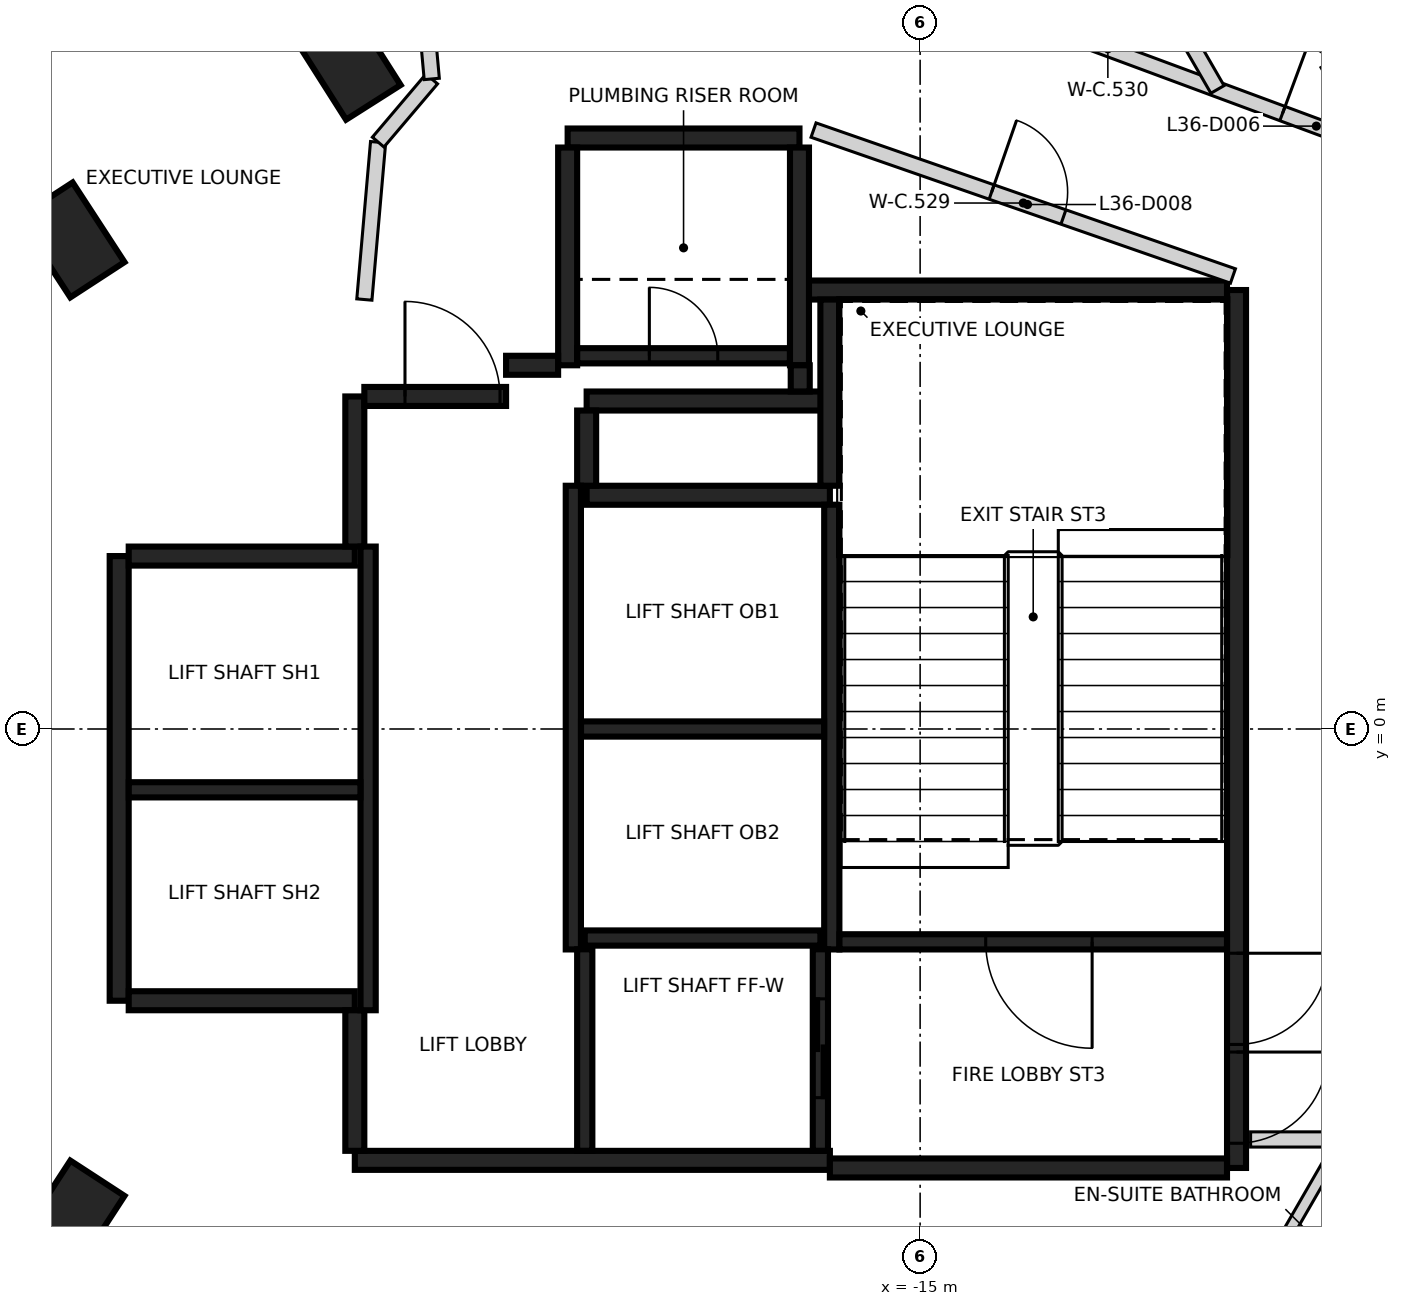
"""IFC4 building model, lengths in metres.
Left out: names, types, materials, properties, quantities, classifications, styles, units other than length and angle.
Written with IfcOpenShell. Run it as: python <this file> out.ifc"""

import sys

from ifc_helpers import new_model, si_unit, direction, frame, frame_2d, origin, origin_2d, place, context, subcontext, project, spatial, rectangle, extrude, element, fill, save


model = new_model("IFC4")
c1 = context("Model", 3, precision=1e-05, world=origin(), true_north=direction((0.0, 1.0)))
c2 = subcontext(c1, "Body", "Model", "MODEL_VIEW")
j1 = project(units=[si_unit("LENGTHUNIT", "METRE"), si_unit("PLANEANGLEUNIT", "RADIAN")], contexts=[c1])
p1 = place(None, origin())
s1 = spatial("IfcSite", under=j1, at=p1, CompositionType="ELEMENT")
p2 = place(p1, origin())
s2 = spatial("IfcBuilding", under=s1, at=p2, CompositionType="ELEMENT")
p3 = place(p2, frame((0.0, 0.0, 146.8)))
s3 = spatial("IfcBuildingStorey", under=s2, at=p3, CompositionType="ELEMENT", Elevation=146.8)
for number, where, z_axis, x_axis in (
    (1, (-22.529, 8.772, -0.4), (0.0, 0.0, 1.0), (-0.536, 0.844, 0.0)),
    (2, (-26.165, 6.434, -0.4), (0.0, 0.0, 1.0), (-0.546, 0.838, 0.0)),
    (3, (-26.165, -6.434, -0.4), (0.0, 0.0, 1.0), (0.546, 0.838, 0.0)),
):
    element("IfcColumn", number, at=place(p3, frame(where, z_axis=z_axis, x_axis=x_axis)), inside=s3, PredefinedType="COLUMN", context=c2, shape_type="SweptSolid", body=[
        extrude(rectangle(XDim=1.25, YDim=0.85, at=origin_2d()), origin(), (0.0, 0.0, 1.0), 3.6),
    ])
p4 = place(p3, frame((-10.837, 5.775, 0.0), z_axis=(0.0, 0.0, 1.0), x_axis=(0.0, -1.0, 0.0)))
e4 = element("IfcWall", 4, at=p4, inside=s3, PredefinedType="SHEAR", context=c2, shape_type="SweptSolid", body=[
    extrude(rectangle(XDim=11.55, YDim=0.25, at=frame_2d((5.775, 0.0))), origin(), (0.0, 0.0, 1.0), 3.2),
])
p5 = place(p4, frame((10.025, 0.0, 0.0)))
e5 = element("IfcOpeningElement", 5, at=p5, cuts=e4, PredefinedType="OPENING", context=c2, shape_type="SweptSolid", body=[
    extrude(rectangle(XDim=1.2, YDim=2.1, at=frame_2d((0.6, 1.05))), frame((0.0, 0.135, 0.0), z_axis=(0.0, -1.0, 0.0), x_axis=(1.0, 0.0, 0.0)), (0.0, 0.0, 1.0), 0.27),
])
p6 = place(p4, frame((8.725, 0.0, 0.0)))
e6 = element("IfcOpeningElement", 6, at=p6, cuts=e4, PredefinedType="OPENING", context=c2, shape_type="SweptSolid", body=[
    extrude(rectangle(XDim=1.2, YDim=2.1, at=frame_2d((0.6, 1.05))), frame((0.0, 0.135, 0.0), z_axis=(0.0, -1.0, 0.0), x_axis=(1.0, 0.0, 0.0)), (0.0, 0.0, 1.0), 0.27),
])
p7 = place(p3, frame((-16.187, -5.675, 0.0), z_axis=(0.0, 0.0, 1.0), x_axis=(-1.0, 0.0, 0.0)))
e7 = element("IfcWall", 7, at=p7, inside=s3, PredefinedType="SHEAR", context=c2, shape_type="SweptSolid", body=[
    extrude(rectangle(XDim=6.25, YDim=0.25, at=frame_2d((3.125, 0.0))), origin(), (0.0, 0.0, 1.0), 3.2),
])
p8 = place(p3, frame((-25.537, -3.575, 0.0), z_axis=(0.0, 0.0, 1.0), x_axis=(0.0, 1.0, 0.0)))
e8 = element("IfcWall", 8, at=p8, inside=s3, PredefinedType="SHEAR", context=c2, shape_type="SweptSolid", body=[
    extrude(rectangle(XDim=5.85, YDim=0.25, at=frame_2d((2.925, 0.0))), origin(), (0.0, 0.0, 1.0), 3.2),
])
p9 = place(p3, frame((-10.963, -5.775, 0.0), z_axis=(0.0, 0.0, 1.0), x_axis=(-1.0, 0.0, 0.0)))
e9 = element("IfcWall", 9, at=p9, inside=s3, PredefinedType="SHEAR", context=c2, shape_type="SweptSolid", body=[
    extrude(rectangle(XDim=5.225, YDim=0.25, at=frame_2d((2.612, 0.0))), origin(), (0.0, 0.0, 1.0), 3.2),
])
p10 = place(p3, frame((-16.472, 5.775, 0.0), z_axis=(0.0, 0.0, 1.0), x_axis=(1.0, 0.0, 0.0)))
e10 = element("IfcWall", 10, at=p10, inside=s3, PredefinedType="SHEAR", context=c2, shape_type="SweptSolid", body=[
    extrude(rectangle(XDim=5.51, YDim=0.25, at=frame_2d((2.755, 0.0))), origin(), (0.0, 0.0, 1.0), 3.2),
])
p11 = place(p3, frame((-19.387, 3.075, 0.0), z_axis=(0.0, 0.0, 1.0), x_axis=(1.0, 0.0, 0.0)))
e11 = element("IfcWall", 11, at=p11, inside=s3, PredefinedType="SHEAR", context=c2, shape_type="SweptSolid", body=[
    extrude(rectangle(XDim=3.2, YDim=0.25, at=frame_2d((1.6, 0.0))), origin(), (0.0, 0.0, 1.0), 3.2),
])
for number, where, z_axis, x_axis in (
    (12, (-22.437, -3.575, 0.0), (0.0, 0.0, 1.0), (-1.0, 0.0, 0.0)),
    (13, (-25.412, 2.275, 0.0), (0.0, 0.0, 1.0), (1.0, 0.0, 0.0)),
):
    element("IfcWall", number, at=place(p3, frame(where, z_axis=z_axis, x_axis=x_axis)), inside=s3, PredefinedType="SHEAR", context=c2, shape_type="SweptSolid", body=[
        extrude(rectangle(XDim=2.975, YDim=0.25, at=frame_2d((1.487, 0.0))), origin(), (0.0, 0.0, 1.0), 3.2),
    ])
p12 = place(p3, frame((-19.637, 7.775, 0.0), z_axis=(0.0, 0.0, 1.0), x_axis=(1.0, 0.0, 0.0)))
e14 = element("IfcWall", 14, at=p12, inside=s3, PredefinedType="SHEAR", context=c2, shape_type="SweptSolid", body=[
    extrude(rectangle(XDim=3.05, YDim=0.25, at=frame_2d((1.525, 0.0))), origin(), (0.0, 0.0, 1.0), 3.2),
])
for number, where, z_axis, x_axis in (
    (15, (-16.587, 7.65, 0.0), (0.0, 0.0, 1.0), (0.0, -1.0, 0.0)),
    (16, (-19.637, 4.785, 0.0), (0.0, 0.0, 1.0), (0.0, 1.0, 0.0)),
):
    element("IfcWall", number, at=place(p3, frame(where, z_axis=z_axis, x_axis=x_axis)), inside=s3, PredefinedType="SHEAR", context=c2, shape_type="SweptSolid", body=[
        extrude(rectangle(XDim=2.865, YDim=0.25, at=frame_2d((1.432, 0.0))), origin(), (0.0, 0.0, 1.0), 3.2),
    ])
p13 = place(p3, frame((-16.302, 4.315, 0.0), z_axis=(0.0, 0.0, 1.0), x_axis=(-1.0, 0.0, 0.0)))
e17 = element("IfcWall", 17, at=p13, inside=s3, PredefinedType="SHEAR", context=c2, shape_type="SweptSolid", body=[
    extrude(rectangle(XDim=3.085, YDim=0.25, at=frame_2d((1.542, 0.0))), origin(), (0.0, 0.0, 1.0), 3.2),
])
p14 = place(p3, frame((-16.187, 3.2, 0.0), z_axis=(0.0, 0.0, 1.0), x_axis=(0.0, 1.0, 0.0)))
e18 = element("IfcWall", 18, at=p14, inside=s3, PredefinedType="SHEAR", context=c2, shape_type="SweptSolid", body=[
    extrude(rectangle(XDim=2.449, YDim=0.25, at=frame_2d((1.225, 0.0))), origin(), (0.0, 0.0, 1.0), 3.2),
])
p15 = place(p3, frame((-22.437, 2.4, 0.0), z_axis=(0.0, 0.0, 1.0), x_axis=(0.0, 1.0, 0.0)))
e19 = element("IfcWall", 19, at=p15, inside=s3, PredefinedType="SHEAR", context=c2, shape_type="SweptSolid", body=[
    extrude(rectangle(XDim=1.975, YDim=0.25, at=frame_2d((0.987, 0.0))), origin(), (0.0, 0.0, 1.0), 3.2),
])
p16 = place(p3, frame((-22.437, -5.55, 0.0), z_axis=(0.0, 0.0, 1.0), x_axis=(0.0, 1.0, 0.0)))
e20 = element("IfcWall", 20, at=p16, inside=s3, PredefinedType="SHEAR", context=c2, shape_type="SweptSolid", body=[
    extrude(rectangle(XDim=1.849, YDim=0.25, at=frame_2d((0.925, 0.0))), origin(), (0.0, 0.0, 1.0), 3.2),
])
p17 = place(p3, frame((-22.312, 4.375, 0.0), z_axis=(0.0, 0.0, 1.0), x_axis=(1.0, 0.0, 0.0)))
e21 = element("IfcWall", 21, at=p17, inside=s3, PredefinedType="SHEAR", context=c2, shape_type="SweptSolid", body=[
    extrude(rectangle(XDim=1.865, YDim=0.25, at=frame_2d((0.932, 0.0))), origin(), (0.0, 0.0, 1.0), 3.2),
])
p18 = place(p17, frame((0.535, 0.0, 0.0)))
e22 = element("IfcOpeningElement", 22, at=p18, cuts=e21, PredefinedType="OPENING", context=c2, shape_type="SweptSolid", body=[
    extrude(rectangle(XDim=1.25, YDim=2.1, at=frame_2d((0.625, 1.05))), frame((0.0, 0.135, 0.0), z_axis=(0.0, -1.0, 0.0), x_axis=(1.0, 0.0, 0.0)), (0.0, 0.0, 1.0), 0.27),
])
p19 = place(p3, frame((-19.387, 4.19, 0.0), z_axis=(0.0, 0.0, 1.0), x_axis=(0.0, -1.0, 0.0)))
e23 = element("IfcWall", 23, at=p19, inside=s3, PredefinedType="SHEAR", context=c2, shape_type="SweptSolid", body=[
    extrude(rectangle(XDim=0.989, YDim=0.25, at=frame_2d((0.495, 0.0))), origin(), (0.0, 0.0, 1.0), 3.2),
])
p20 = place(p3, frame((-20.447, 4.785, 0.0), z_axis=(0.0, 0.0, 1.0), x_axis=(1.0, 0.0, 0.0)))
e24 = element("IfcWall", 24, at=p20, inside=s3, PredefinedType="SHEAR", context=c2, shape_type="SweptSolid", body=[
    extrude(rectangle(XDim=0.685, YDim=0.25, at=frame_2d((0.342, 0.0))), origin(), (0.0, 0.0, 1.0), 3.2),
])
p21 = place(p3, frame((-16.577, 4.785, 0.0), z_axis=(0.0, 0.0, 1.0), x_axis=(0.0, -1.0, 0.0)))
e25 = element("IfcWall", 25, at=p21, inside=s3, PredefinedType="SHEAR", context=c2, shape_type="SweptSolid", body=[
    extrude(rectangle(XDim=0.344, YDim=0.25, at=frame_2d((0.172, 0.0))), origin(), (0.0, 0.0, 1.0), 3.2),
])
p22 = place(p3, frame((-16.162, 2.951, 0.0), z_axis=(0.0, 0.0, 1.0), x_axis=(0.0, -1.0, 0.0)))
e26 = element("IfcWall", 26, at=p22, inside=s3, PredefinedType="SHEAR", context=c2, shape_type="SweptSolid", body=[
    extrude(rectangle(XDim=5.851, YDim=0.2, at=frame_2d((2.925, 0.0))), origin(), (0.0, 0.0, 1.0), 3.2),
])
for number, where, z_axis, x_axis in (
    (27, (-19.562, -2.9, 0.0), (0.0, 0.0, 1.0), (0.0, 1.0, 0.0)),
    (28, (-22.262, 2.4, 0.0), (0.0, 0.0, 1.0), (0.0, -1.0, 0.0)),
):
    element("IfcWall", number, at=place(p3, frame(where, z_axis=z_axis, x_axis=x_axis)), inside=s3, PredefinedType="SHEAR", context=c2, shape_type="SweptSolid", body=[
        extrude(rectangle(XDim=6.1, YDim=0.2, at=frame_2d((3.05, 0.0))), origin(), (0.0, 0.0, 1.0), 3.2),
    ])
p23 = place(p3, frame((-10.963, -2.8, 0.0), z_axis=(0.0, 0.0, 1.0), x_axis=(-1.0, 0.0, 0.0)))
e29 = element("IfcWall", 29, at=p23, inside=s3, PredefinedType="SHEAR", context=c2, shape_type="SweptSolid", body=[
    extrude(rectangle(XDim=5.098, YDim=0.2, at=frame_2d((2.549, 0.0))), origin(), (0.0, 0.0, 1.0), 3.2),
])
p24 = place(p23, frame((1.774, 0.0, 0.0)))
e30 = element("IfcOpeningElement", 30, at=p24, cuts=e29, PredefinedType="OPENING", context=c2, shape_type="SweptSolid", body=[
    extrude(rectangle(XDim=1.4, YDim=2.1, at=frame_2d((0.7, 1.05))), frame((0.0, 0.11, 0.0), z_axis=(0.0, -1.0, 0.0), x_axis=(1.0, 0.0, 0.0)), (0.0, 0.0, 1.0), 0.22),
])
p25 = place(p3, frame((-16.263, 0.0, 0.0), z_axis=(0.0, 0.0, 1.0), x_axis=(-1.0, 0.0, 0.0)))
e31 = element("IfcWall", 31, at=p25, inside=s3, PredefinedType="SHEAR", context=c2, shape_type="SweptSolid", body=[
    extrude(rectangle(XDim=3.198, YDim=0.2, at=frame_2d((1.599, 0.0))), origin(), (0.0, 0.0, 1.0), 3.2),
])
p26 = place(p3, frame((-22.363, -0.8, 0.0), z_axis=(0.0, 0.0, 1.0), x_axis=(-1.0, 0.0, 0.0)))
e32 = element("IfcWall", 32, at=p26, inside=s3, PredefinedType="SHEAR", context=c2, shape_type="SweptSolid", body=[
    extrude(rectangle(XDim=3.048, YDim=0.2, at=frame_2d((1.524, 0.0))), origin(), (0.0, 0.0, 1.0), 3.2),
])
p27 = place(p3, frame((-19.511, 4.91, 0.0), z_axis=(0.0, 0.0, 1.0), x_axis=(1.0, 0.0, 0.0)))
e33 = element("IfcWall", 33, at=p27, inside=s3, PredefinedType="SHEAR", context=c2, shape_type="SweptSolid", body=[
    extrude(rectangle(XDim=2.798, YDim=0.2, at=frame_2d((1.399, 0.0))), origin(), (0.0, 0.0, 1.0), 3.2),
])
p28 = place(p27, frame((0.949, 0.0, 0.0)))
e34 = element("IfcOpeningElement", 34, at=p28, cuts=e33, PredefinedType="OPENING", context=c2, shape_type="SweptSolid", body=[
    extrude(rectangle(XDim=0.9, YDim=2.1, at=frame_2d((0.45, 1.05))), frame((0.0, 0.11, 0.0), z_axis=(0.0, -1.0, 0.0), x_axis=(1.0, 0.0, 0.0)), (0.0, 0.0, 1.0), 0.22),
])
p29 = place(p3, frame((-19.412, -2.75, 0.0), z_axis=(0.0, 0.0, 1.0), x_axis=(1.0, 0.0, 0.0)))
e35 = element("IfcWall", 35, at=p29, inside=s3, PredefinedType="SHEAR", context=c2, shape_type="SweptSolid", body=[
    extrude(rectangle(XDim=3.1, YDim=0.2, at=frame_2d((1.55, 0.0))), origin(), (0.0, 0.0, 1.0), 3.2),
])
p30 = place(p3, frame((-16.312, -2.898, 0.0), z_axis=(0.0, 0.0, 1.0), x_axis=(0.0, -1.0, 0.0)))
e36 = element("IfcWall", 36, at=p30, inside=s3, PredefinedType="SHEAR", context=c2, shape_type="SweptSolid", body=[
    extrude(rectangle(XDim=2.651, YDim=0.2, at=frame_2d((1.325, 0.0))), origin(), (0.0, 0.0, 1.0), 3.2),
])
p31 = place(p30, frame((0.652, 0.0, 0.0)))
e37 = element("IfcOpeningElement", 37, at=p31, cuts=e36, PredefinedType="OPENING", context=c2, shape_type="SweptSolid", body=[
    extrude(rectangle(XDim=1.3, YDim=2.1, at=frame_2d((0.65, 1.05))), frame((0.0, 0.11, 0.0), z_axis=(0.0, -1.0, 0.0), x_axis=(1.0, 0.0, 0.0)), (0.0, 0.0, 1.0), 0.22),
])
p32 = place(p3, frame((-19.412, -5.549, 0.0), z_axis=(0.0, 0.0, 1.0), x_axis=(0.0, 1.0, 0.0)))
e38 = element("IfcWall", 38, at=p32, inside=s3, PredefinedType="SHEAR", context=c2, shape_type="SweptSolid", body=[
    extrude(rectangle(XDim=2.651, YDim=0.2, at=frame_2d((1.325, 0.0))), origin(), (0.0, 0.0, 1.0), 3.2),
])
p33 = place(p3, frame((-22.131, 7.72, 0.0), z_axis=(0.0, 0.0, 1.0), x_axis=(-0.086827346826, -0.996223374471, 0.0)))
e39 = element("IfcWall", 39, at=p33, inside=s3, PredefinedType="PARTITIONING", context=c2, shape_type="SweptSolid", body=[
    extrude(rectangle(XDim=2.078, YDim=0.2, at=frame_2d((1.039, 0.0))), origin(), (0.0, 0.0, 1.0), 3.2),
])
p34 = place(p3, frame((-22.13, 7.721, 0.0), z_axis=(0.0, 0.0, 1.0), x_axis=(0.646815590698, 0.762646439466, 0.0)))
e40 = element("IfcWall", 40, at=p34, inside=s3, PredefinedType="PARTITIONING", context=c2, shape_type="SweptSolid", body=[
    extrude(rectangle(XDim=1.09, YDim=0.2, at=frame_2d((0.545, 0.0))), origin(), (0.0, 0.0, 1.0), 3.2),
])
p35 = place(p3, frame((-21.521, 9.614, 0.0), z_axis=(0.0, 0.0, 1.0), x_axis=(0.089978363699, -0.995943720331, 0.0)))
e41 = element("IfcWall", 41, at=p35, inside=s3, PredefinedType="PARTITIONING", context=c2, shape_type="SweptSolid", body=[
    extrude(rectangle(XDim=1.066, YDim=0.2, at=frame_2d((0.533, 0.0))), origin(), (0.0, 0.0, 1.0), 2.3),
])
p36 = place(p3, frame((-16.402, 7.879, 0.0), z_axis=(0.0, 0.0, 1.0), x_axis=(0.94449961557, -0.328512520596, 0.0)))
e42 = element("IfcWall", 42, at=p36, inside=s3, PredefinedType="PARTITIONING", context=c2, shape_type="SweptSolid", body=[
    extrude(rectangle(XDim=5.842, YDim=0.2, at=frame_2d((2.921, 0.0))), origin(), (0.0, 0.0, 1.0), 3.2),
])
p37 = place(p36, frame((2.481, 0.0, 0.0)))
e43 = element("IfcOpeningElement", 43, at=p37, cuts=e42, PredefinedType="OPENING", context=c2, shape_type="SweptSolid", body=[
    extrude(rectangle(XDim=1.0, YDim=2.1, at=frame_2d((0.5, 1.05))), frame((0.0, 0.11, 0.0), z_axis=(0.0, -1.0, 0.0), x_axis=(1.0, 0.0, 0.0)), (0.0, 0.0, 1.0), 0.22),
])
p38 = place(p3, frame((-16.026, 10.245, 0.0), z_axis=(0.0, 0.0, 1.0), x_axis=(0.937607706988, -0.347694963721, 0.0)))
e44 = element("IfcWall", 44, at=p38, inside=s3, PredefinedType="PARTITIONING", context=c2, shape_type="SweptSolid", body=[
    extrude(rectangle(XDim=7.458, YDim=0.2, at=frame_2d((3.729, 0.0))), origin(), (0.0, 0.0, 1.0), 3.2),
])
p39 = place(p38, frame((6.179, 0.0, 0.0)))
e45 = element("IfcOpeningElement", 45, at=p39, cuts=e44, PredefinedType="OPENING", context=c2, shape_type="SweptSolid", body=[
    extrude(rectangle(XDim=0.95, YDim=2.1, at=frame_2d((0.475, 1.05))), frame((0.0, 0.11, 0.0), z_axis=(0.0, -1.0, 0.0), x_axis=(1.0, 0.0, 0.0)), (0.0, 0.0, 1.0), 0.22),
])
p40 = place(p38, frame((2.139, 0.0, 0.0)))
e46 = element("IfcOpeningElement", 46, at=p40, cuts=e44, PredefinedType="OPENING", context=c2, shape_type="SweptSolid", body=[
    extrude(rectangle(XDim=1.0, YDim=2.1, at=frame_2d((0.5, 1.05))), frame((0.0, 0.11, 0.0), z_axis=(0.0, -1.0, 0.0), x_axis=(1.0, 0.0, 0.0)), (0.0, 0.0, 1.0), 0.22),
])
p41 = place(p3, frame((-10.652, -5.4, 0.0), z_axis=(0.0, 0.0, 1.0), x_axis=(1.0, 0.0, 0.0)))
e47 = element("IfcWall", 47, at=p41, inside=s3, PredefinedType="PARTITIONING", context=c2, shape_type="SweptSolid", body=[
    extrude(rectangle(XDim=1.205, YDim=0.2, at=frame_2d((0.603, 0.0))), origin(), (0.0, 0.0, 1.0), 3.2),
])
p42 = place(p3, frame((-15.467, 15.998, 0.0), z_axis=(0.0, 0.0, 1.0), x_axis=(0.500003998589, -0.866023095186, 0.0)))
e48 = element("IfcWall", 48, at=p42, inside=s3, PredefinedType="PARTITIONING", context=c2, shape_type="SweptSolid", body=[
    extrude(rectangle(XDim=8.757, YDim=0.2, at=frame_2d((4.379, 0.0))), origin(), (0.0, 0.0, 1.0), 2.3),
])
p43 = place(p3, frame((-10.809, 18.731, 0.0), z_axis=(0.0, 0.0, 1.0), x_axis=(0.500004774777, -0.866022647048, 0.0)))
e49 = element("IfcWall", 49, at=p43, inside=s3, PredefinedType="PARTITIONING", context=c2, shape_type="SweptSolid", body=[
    extrude(rectangle(XDim=12.227, YDim=0.2, at=frame_2d((6.113, 0.0))), origin(), (0.0, 0.0, 1.0), 2.3),
])
p44 = place(p3, frame((-10.946, -7.996, 0.0), z_axis=(0.0, 0.0, 1.0), x_axis=(0.500027927039, 0.866009279501, 0.0)))
e50 = element("IfcWall", 50, at=p44, inside=s3, PredefinedType="PARTITIONING", context=c2, shape_type="SweptSolid", body=[
    extrude(rectangle(XDim=2.998, YDim=0.15, at=frame_2d((1.499, 0.0))), origin(), (0.0, 0.0, 1.0), 3.2),
])
p45 = place(p3, frame((-9.661, 8.74, 0.0), z_axis=(0.0, 0.0, 1.0), x_axis=(0.49990192124, -0.866082022179, 0.0)))
e51 = element("IfcWall", 51, at=p45, inside=s3, PredefinedType="PARTITIONING", context=c2, shape_type="SweptSolid", body=[
    extrude(rectangle(XDim=1.256, YDim=0.15, at=frame_2d((0.628, 0.0))), origin(), (0.0, 0.0, 1.0), 3.2),
])
p46 = place(p31, origin())
e52 = element("IfcDoor", 52, at=p46, inside=s3, OperationType="SLIDING_TO_RIGHT", PredefinedType="DOOR", context=c2, shape_type="SweptSolid", body=[
    extrude(rectangle(XDim=1.3, YDim=2.1, at=frame_2d((0.65, 1.05))), frame((0.0, 0.025, 0.0), z_axis=(0.0, -1.0, 0.0), x_axis=(1.0, 0.0, 0.0)), (0.0, 0.0, 1.0), 0.05),
])
fill(e37, e52)
p47 = place(p18, origin())
e53 = element("IfcDoor", 53, at=p47, inside=s3, OperationType="SINGLE_SWING_LEFT", PredefinedType="DOOR", context=c2, shape_type="SweptSolid", body=[
    extrude(rectangle(XDim=1.25, YDim=2.1, at=frame_2d((0.625, 1.05))), frame((0.0, 0.025, 0.0), z_axis=(0.0, -1.0, 0.0), x_axis=(1.0, 0.0, 0.0)), (0.0, 0.0, 1.0), 0.05),
])
fill(e22, e53)
p48 = place(p5, origin())
e54 = element("IfcDoor", 54, at=p48, inside=s3, OperationType="SINGLE_SWING_LEFT", PredefinedType="DOOR", context=c2, shape_type="SweptSolid", body=[
    extrude(rectangle(XDim=1.2, YDim=2.1, at=frame_2d((0.6, 1.05))), frame((0.0, 0.025, 0.0), z_axis=(0.0, -1.0, 0.0), x_axis=(1.0, 0.0, 0.0)), (0.0, 0.0, 1.0), 0.05),
])
fill(e5, e54)
p49 = place(p6, origin())
e55 = element("IfcDoor", 55, at=p49, inside=s3, OperationType="SINGLE_SWING_RIGHT", PredefinedType="DOOR", context=c2, shape_type="SweptSolid", body=[
    extrude(rectangle(XDim=1.2, YDim=2.1, at=frame_2d((0.6, 1.05))), frame((0.0, 0.025, 0.0), z_axis=(0.0, -1.0, 0.0), x_axis=(1.0, 0.0, 0.0)), (0.0, 0.0, 1.0), 0.05),
])
fill(e6, e55)
p50 = place(p24, origin())
e56 = element("IfcDoor", 56, at=p50, inside=s3, OperationType="SINGLE_SWING_RIGHT", PredefinedType="DOOR", context=c2, shape_type="SweptSolid", body=[
    extrude(rectangle(XDim=1.4, YDim=2.1, at=frame_2d((0.7, 1.05))), frame((0.0, 0.025, 0.0), z_axis=(0.0, -1.0, 0.0), x_axis=(1.0, 0.0, 0.0)), (0.0, 0.0, 1.0), 0.05),
])
fill(e30, e56)
p51 = place(p28, origin())
e57 = element("IfcDoor", 57, at=p51, inside=s3, OperationType="SINGLE_SWING_LEFT", PredefinedType="DOOR", context=c2, shape_type="SweptSolid", body=[
    extrude(rectangle(XDim=0.9, YDim=2.1, at=frame_2d((0.45, 1.05))), frame((0.0, 0.025, 0.0), z_axis=(0.0, -1.0, 0.0), x_axis=(1.0, 0.0, 0.0)), (0.0, 0.0, 1.0), 0.05),
])
fill(e34, e57)
p52 = place(p39, origin())
e58 = element("IfcDoor", 58, at=p52, inside=s3, OperationType="SINGLE_SWING_LEFT", PredefinedType="DOOR", context=c2, shape_type="SweptSolid", body=[
    extrude(rectangle(XDim=0.95, YDim=2.1, at=frame_2d((0.475, 1.05))), frame((0.0, 0.025, 0.0), z_axis=(0.0, -1.0, 0.0), x_axis=(1.0, 0.0, 0.0)), (0.0, 0.0, 1.0), 0.05),
])
fill(e45, e58)
p53 = place(p37, frame((1.0, 0.0, 0.0), z_axis=(0.0, 0.0, 1.0), x_axis=(-1.0, 0.0, 0.0)))
e59 = element("IfcDoor", 59, at=p53, inside=s3, OperationType="SINGLE_SWING_LEFT", PredefinedType="DOOR", context=c2, shape_type="SweptSolid", body=[
    extrude(rectangle(XDim=1.0, YDim=2.1, at=frame_2d((0.5, 1.05))), frame((0.0, 0.025, 0.0), z_axis=(0.0, -1.0, 0.0), x_axis=(1.0, 0.0, 0.0)), (0.0, 0.0, 1.0), 0.05),
])
fill(e43, e59)
save(model, sys.argv[1])
